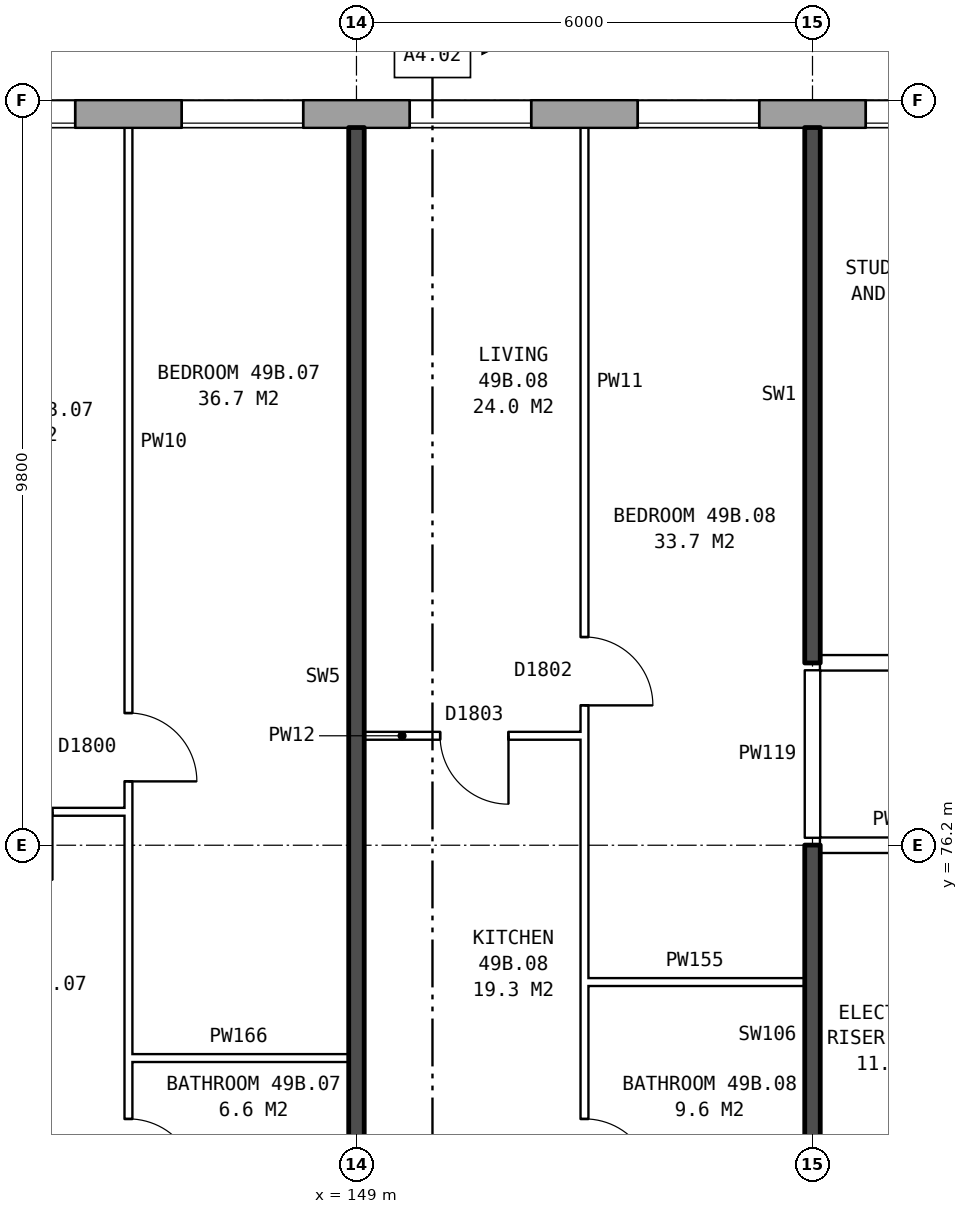
"""IFC4 building model, lengths in metres.
Left out: names, types, materials, properties, quantities, classifications, styles, units other than length and angle.
Written with IfcOpenShell. Run it as: python <this file> out.ifc"""

import sys

from ifc_helpers import new_model, si_unit, direction, frame, frame_2d, origin, place, context, subcontext, project, spatial, rectangle, extrude, element, fill, save


model = new_model("IFC4")
c1 = context("Model", 3, precision=1e-05, world=origin(), true_north=direction((0.0, 1.0)))
c2 = subcontext(c1, "Body", "Model", "MODEL_VIEW")
j1 = project(units=[si_unit("LENGTHUNIT", "METRE"), si_unit("PLANEANGLEUNIT", "RADIAN")], contexts=[c1])
p1 = place(None, origin())
s1 = spatial("IfcSite", under=j1, at=p1, CompositionType="ELEMENT")
p2 = place(p1, origin())
s2 = spatial("IfcBuilding", under=s1, at=p2, CompositionType="ELEMENT")
p3 = place(p2, frame((0.0, 0.0, 175.8)))
s3 = spatial("IfcBuildingStorey", under=s2, at=p3, CompositionType="ELEMENT", Elevation=175.8)
p4 = place(p3, frame((167.175, 85.82, 0.0), z_axis=(0.0, 0.0, 1.0), x_axis=(-1.0, 0.0, 0.0)))
e1 = element("IfcWall", 1, at=p4, inside=s3, PredefinedType="STANDARD", context=c2, shape_type="SweptSolid", body=[
    extrude(rectangle(XDim=33.101, YDim=0.36, at=frame_2d((16.55, 0.0))), origin(), (0.0, 0.0, 1.0), 2.85),
])
p5 = place(p4, frame((0.3, 0.0, 0.8)))
e2 = element("IfcOpeningElement", 2, at=p5, cuts=e1, PredefinedType="OPENING", context=c2, shape_type="SweptSolid", body=[
    extrude(rectangle(XDim=0.6, YDim=1.8, at=frame_2d((0.3, 0.9))), frame((0.0, 0.19, 0.0), z_axis=(0.0, -1.0, 0.0), x_axis=(1.0, 0.0, 0.0)), (0.0, 0.0, 1.0), 0.38),
])
p6 = place(p4, frame((3.875, 0.0, 0.8)))
e3 = element("IfcOpeningElement", 3, at=p6, cuts=e1, PredefinedType="OPENING", context=c2, shape_type="SweptSolid", body=[
    extrude(rectangle(XDim=1.6, YDim=1.8, at=frame_2d((0.8, 0.9))), frame((0.0, 0.19, 0.0), z_axis=(0.0, -1.0, 0.0), x_axis=(1.0, 0.0, 0.0)), (0.0, 0.0, 1.0), 0.38),
])
p7 = place(p4, frame((6.875, 0.0, 0.8)))
e4 = element("IfcOpeningElement", 4, at=p7, cuts=e1, PredefinedType="OPENING", context=c2, shape_type="SweptSolid", body=[
    extrude(rectangle(XDim=1.6, YDim=1.8, at=frame_2d((0.8, 0.9))), frame((0.0, 0.19, 0.0), z_axis=(0.0, -1.0, 0.0), x_axis=(1.0, 0.0, 0.0)), (0.0, 0.0, 1.0), 0.38),
])
p8 = place(p4, frame((9.875, 0.0, 0.8)))
e5 = element("IfcOpeningElement", 5, at=p8, cuts=e1, PredefinedType="OPENING", context=c2, shape_type="SweptSolid", body=[
    extrude(rectangle(XDim=1.6, YDim=1.8, at=frame_2d((0.8, 0.9))), frame((0.0, 0.19, 0.0), z_axis=(0.0, -1.0, 0.0), x_axis=(1.0, 0.0, 0.0)), (0.0, 0.0, 1.0), 0.38),
])
p9 = place(p4, frame((12.875, 0.0, 0.8)))
e6 = element("IfcOpeningElement", 6, at=p9, cuts=e1, PredefinedType="OPENING", context=c2, shape_type="SweptSolid", body=[
    extrude(rectangle(XDim=1.6, YDim=1.8, at=frame_2d((0.8, 0.9))), frame((0.0, 0.19, 0.0), z_axis=(0.0, -1.0, 0.0), x_axis=(1.0, 0.0, 0.0)), (0.0, 0.0, 1.0), 0.38),
])
p10 = place(p4, frame((15.875, 0.0, 0.8)))
e7 = element("IfcOpeningElement", 7, at=p10, cuts=e1, PredefinedType="OPENING", context=c2, shape_type="SweptSolid", body=[
    extrude(rectangle(XDim=1.6, YDim=1.8, at=frame_2d((0.8, 0.9))), frame((0.0, 0.19, 0.0), z_axis=(0.0, -1.0, 0.0), x_axis=(1.0, 0.0, 0.0)), (0.0, 0.0, 1.0), 0.38),
])
p11 = place(p4, frame((18.875, 0.0, 0.8)))
e8 = element("IfcOpeningElement", 8, at=p11, cuts=e1, PredefinedType="OPENING", context=c2, shape_type="SweptSolid", body=[
    extrude(rectangle(XDim=1.6, YDim=1.8, at=frame_2d((0.8, 0.9))), frame((0.0, 0.19, 0.0), z_axis=(0.0, -1.0, 0.0), x_axis=(1.0, 0.0, 0.0)), (0.0, 0.0, 1.0), 0.38),
])
p12 = place(p4, frame((21.875, 0.0, 0.8)))
e9 = element("IfcOpeningElement", 9, at=p12, cuts=e1, PredefinedType="OPENING", context=c2, shape_type="SweptSolid", body=[
    extrude(rectangle(XDim=1.6, YDim=1.8, at=frame_2d((0.8, 0.9))), frame((0.0, 0.19, 0.0), z_axis=(0.0, -1.0, 0.0), x_axis=(1.0, 0.0, 0.0)), (0.0, 0.0, 1.0), 0.38),
])
p13 = place(p4, frame((24.875, 0.0, 0.8)))
e10 = element("IfcOpeningElement", 10, at=p13, cuts=e1, PredefinedType="OPENING", context=c2, shape_type="SweptSolid", body=[
    extrude(rectangle(XDim=1.6, YDim=1.8, at=frame_2d((0.8, 0.9))), frame((0.0, 0.19, 0.0), z_axis=(0.0, -1.0, 0.0), x_axis=(1.0, 0.0, 0.0)), (0.0, 0.0, 1.0), 0.38),
])
p14 = place(p4, frame((27.875, 0.0, 0.8)))
e11 = element("IfcOpeningElement", 11, at=p14, cuts=e1, PredefinedType="OPENING", context=c2, shape_type="SweptSolid", body=[
    extrude(rectangle(XDim=1.6, YDim=1.8, at=frame_2d((0.8, 0.9))), frame((0.0, 0.19, 0.0), z_axis=(0.0, -1.0, 0.0), x_axis=(1.0, 0.0, 0.0)), (0.0, 0.0, 1.0), 0.38),
])
p15 = place(p4, frame((31.575, 0.0, 1.4)))
e12 = element("IfcOpeningElement", 12, at=p15, cuts=e1, PredefinedType="OPENING", context=c2, shape_type="SweptSolid", body=[
    extrude(rectangle(XDim=1.2, YDim=1.2, at=frame_2d((0.6, 0.6))), frame((0.0, 0.19, 0.0), z_axis=(0.0, -1.0, 0.0), x_axis=(1.0, 0.0, 0.0)), (0.0, 0.0, 1.0), 0.38),
])
p16 = place(p4, frame((1.2, 0.0, 1.7)))
e13 = element("IfcOpeningElement", 13, at=p16, cuts=e1, PredefinedType="OPENING", context=c2, shape_type="SweptSolid", body=[
    extrude(rectangle(XDim=0.6, YDim=0.9, at=frame_2d((0.3, 0.45))), frame((0.0, 0.19, 0.0), z_axis=(0.0, -1.0, 0.0), x_axis=(1.0, 0.0, 0.0)), (0.0, 0.0, 1.0), 0.38),
])
p17 = place(p4, frame((2.8, 0.0, 0.8)))
e14 = element("IfcOpeningElement", 14, at=p17, cuts=e1, PredefinedType="OPENING", context=c2, shape_type="SweptSolid", body=[
    extrude(rectangle(XDim=0.6, YDim=0.9, at=frame_2d((0.3, 0.45))), frame((0.0, 0.19, 0.0), z_axis=(0.0, -1.0, 0.0), x_axis=(1.0, 0.0, 0.0)), (0.0, 0.0, 1.0), 0.38),
])
for number, where, z_axis, x_axis in (
    (15, (146.0, 73.4, 0.0), (0.0, 0.0, 1.0), (1.0, 0.0, 0.0)),
    (16, (152.0, 74.4, 0.0), (0.0, 0.0, 1.0), (1.0, 0.0, 0.0)),
):
    element("IfcWall", number, at=place(p3, frame(where, z_axis=z_axis, x_axis=x_axis)), inside=s3, PredefinedType="PARTITIONING", context=c2, shape_type="SweptSolid", body=[
        extrude(rectangle(XDim=2.9, YDim=0.1, at=frame_2d((1.45, 0.0))), origin(), (0.0, 0.0, 1.0), 2.85),
    ])
p18 = place(p3, frame((155.1, 76.2, 0.0), z_axis=(0.0, 0.0, 1.0), x_axis=(1.0, 0.0, 0.0)))
e17 = element("IfcWall", 17, at=p18, inside=s3, PredefinedType="PARTITIONING", context=c2, shape_type="SweptSolid", body=[
    extrude(rectangle(XDim=2.14, YDim=0.2, at=frame_2d((1.07, 0.0))), origin(), (0.0, 0.0, 1.0), 2.85),
])
p19 = place(p3, frame((143.1, 76.64, 0.0), z_axis=(0.0, 0.0, 1.0), x_axis=(1.0, 0.0, 0.0)))
e18 = element("IfcWall", 18, at=p19, inside=s3, PredefinedType="PARTITIONING", context=c2, shape_type="SweptSolid", body=[
    extrude(rectangle(XDim=2.9, YDim=0.1, at=frame_2d((1.45, 0.0))), origin(), (0.0, 0.0, 1.0), 2.85),
])
p20 = place(p19, frame((1.0, 0.0, 0.0)))
e19 = element("IfcOpeningElement", 19, at=p20, cuts=e18, PredefinedType="OPENING", context=c2, shape_type="SweptSolid", body=[
    extrude(rectangle(XDim=0.9, YDim=2.1, at=frame_2d((0.45, 1.05))), frame((0.0, 0.06, 0.0), z_axis=(0.0, -1.0, 0.0), x_axis=(1.0, 0.0, 0.0)), (0.0, 0.0, 1.0), 0.12),
])
p21 = place(p3, frame((149.1, 77.64, 0.0), z_axis=(0.0, 0.0, 1.0), x_axis=(1.0, 0.0, 0.0)))
e20 = element("IfcWall", 20, at=p21, inside=s3, PredefinedType="PARTITIONING", context=c2, shape_type="SweptSolid", body=[
    extrude(rectangle(XDim=2.9, YDim=0.1, at=frame_2d((1.45, 0.0))), origin(), (0.0, 0.0, 1.0), 2.85),
])
p22 = place(p21, frame((1.0, 0.0, 0.0)))
e21 = element("IfcOpeningElement", 21, at=p22, cuts=e20, PredefinedType="OPENING", context=c2, shape_type="SweptSolid", body=[
    extrude(rectangle(XDim=0.9, YDim=2.1, at=frame_2d((0.45, 1.05))), frame((0.0, 0.06, 0.0), z_axis=(0.0, -1.0, 0.0), x_axis=(1.0, 0.0, 0.0)), (0.0, 0.0, 1.0), 0.12),
])
p23 = place(p3, frame((155.1, 78.6, 0.0), z_axis=(0.0, 0.0, 1.0), x_axis=(1.0, 0.0, 0.0)))
e22 = element("IfcWall", 22, at=p23, inside=s3, PredefinedType="PARTITIONING", context=c2, shape_type="SweptSolid", body=[
    extrude(rectangle(XDim=14.79, YDim=0.2, at=frame_2d((7.395, 0.0))), origin(), (0.0, 0.0, 1.0), 2.85),
])
p24 = place(p23, frame((1.45, 0.0, 0.0)))
e23 = element("IfcOpeningElement", 23, at=p24, cuts=e22, PredefinedType="OPENING", context=c2, shape_type="SweptSolid", body=[
    extrude(rectangle(XDim=1.0, YDim=2.1, at=frame_2d((0.5, 1.05))), frame((0.0, 0.11, 0.0), z_axis=(0.0, -1.0, 0.0), x_axis=(1.0, 0.0, 0.0)), (0.0, 0.0, 1.0), 0.22),
])
p25 = place(p23, frame((11.045, 0.0, 0.0)))
e24 = element("IfcOpeningElement", 24, at=p25, cuts=e22, PredefinedType="OPENING", context=c2, shape_type="SweptSolid", body=[
    extrude(rectangle(XDim=1.0, YDim=2.1, at=frame_2d((0.5, 1.05))), frame((0.0, 0.11, 0.0), z_axis=(0.0, -1.0, 0.0), x_axis=(1.0, 0.0, 0.0)), (0.0, 0.0, 1.0), 0.22),
])
p26 = place(p3, frame((146.0, 71.3, 0.0), z_axis=(0.0, 0.0, 1.0), x_axis=(0.0, 1.0, 0.0)))
e25 = element("IfcWall", 25, at=p26, inside=s3, PredefinedType="PARTITIONING", context=c2, shape_type="SweptSolid", body=[
    extrude(rectangle(XDim=14.34, YDim=0.1, at=frame_2d((7.17, 0.0))), origin(), (0.0, 0.0, 1.0), 2.85),
])
p27 = place(p26, frame((5.74, 0.0, 0.0)))
e26 = element("IfcOpeningElement", 26, at=p27, cuts=e25, PredefinedType="OPENING", context=c2, shape_type="SweptSolid", body=[
    extrude(rectangle(XDim=0.9, YDim=2.1, at=frame_2d((0.45, 1.05))), frame((0.0, 0.06, 0.0), z_axis=(0.0, -1.0, 0.0), x_axis=(1.0, 0.0, 0.0)), (0.0, 0.0, 1.0), 0.12),
])
p28 = place(p26, frame((0.4, 0.0, 0.0)))
e27 = element("IfcOpeningElement", 27, at=p28, cuts=e25, PredefinedType="OPENING", context=c2, shape_type="SweptSolid", body=[
    extrude(rectangle(XDim=0.9, YDim=2.1, at=frame_2d((0.45, 1.05))), frame((0.0, 0.06, 0.0), z_axis=(0.0, -1.0, 0.0), x_axis=(1.0, 0.0, 0.0)), (0.0, 0.0, 1.0), 0.12),
])
p29 = place(p3, frame((149.0, 71.2, 0.0), z_axis=(0.0, 0.0, 1.0), x_axis=(0.0, 1.0, 0.0)))
e28 = element("IfcWall", 28, at=p29, inside=s3, PredefinedType="SOLIDWALL", context=c2, shape_type="SweptSolid", body=[
    extrude(rectangle(XDim=14.44, YDim=0.2, at=frame_2d((7.22, 0.0))), origin(), (0.0, 0.0, 1.0), 2.85),
])
p30 = place(p3, frame((152.0, 71.3, 0.0), z_axis=(0.0, 0.0, 1.0), x_axis=(0.0, 1.0, 0.0)))
e29 = element("IfcWall", 29, at=p30, inside=s3, PredefinedType="PARTITIONING", context=c2, shape_type="SweptSolid", body=[
    extrude(rectangle(XDim=14.34, YDim=0.1, at=frame_2d((7.17, 0.0))), origin(), (0.0, 0.0, 1.0), 2.85),
])
p31 = place(p30, frame((6.74, 0.0, 0.0)))
e30 = element("IfcOpeningElement", 30, at=p31, cuts=e29, PredefinedType="OPENING", context=c2, shape_type="SweptSolid", body=[
    extrude(rectangle(XDim=0.9, YDim=2.1, at=frame_2d((0.45, 1.05))), frame((0.0, 0.06, 0.0), z_axis=(0.0, -1.0, 0.0), x_axis=(1.0, 0.0, 0.0)), (0.0, 0.0, 1.0), 0.12),
])
p32 = place(p30, frame((0.4, 0.0, 0.0)))
e31 = element("IfcOpeningElement", 31, at=p32, cuts=e29, PredefinedType="OPENING", context=c2, shape_type="SweptSolid", body=[
    extrude(rectangle(XDim=0.9, YDim=2.1, at=frame_2d((0.45, 1.05))), frame((0.0, 0.06, 0.0), z_axis=(0.0, -1.0, 0.0), x_axis=(1.0, 0.0, 0.0)), (0.0, 0.0, 1.0), 0.12),
])
p33 = place(p3, frame((155.0, 71.2, 0.0), z_axis=(0.0, 0.0, 1.0), x_axis=(0.0, 1.0, 0.0)))
e32 = element("IfcWall", 32, at=p33, inside=s3, PredefinedType="SOLIDWALL", context=c2, shape_type="SweptSolid", body=[
    extrude(rectangle(XDim=5.0, YDim=0.2, at=frame_2d((2.5, 0.0))), origin(), (0.0, 0.0, 1.0), 2.85),
])
p34 = place(p3, frame((155.0, 76.3, 0.0), z_axis=(0.0, 0.0, 1.0), x_axis=(0.0, 1.0, 0.0)))
e33 = element("IfcWall", 33, at=p34, inside=s3, PredefinedType="PARTITIONING", context=c2, shape_type="SweptSolid", body=[
    extrude(rectangle(XDim=2.2, YDim=0.2, at=frame_2d((1.1, 0.0))), origin(), (0.0, 0.0, 1.0), 2.85),
])
p35 = place(p3, frame((155.0, 78.6, 0.0), z_axis=(0.0, 0.0, 1.0), x_axis=(0.0, 1.0, 0.0)))
e34 = element("IfcWall", 34, at=p35, inside=s3, PredefinedType="SOLIDWALL", context=c2, shape_type="SweptSolid", body=[
    extrude(rectangle(XDim=7.04, YDim=0.2, at=frame_2d((3.52, 0.0))), origin(), (0.0, 0.0, 1.0), 2.85),
])
p36 = place(p8, origin())
e35 = element("IfcWindow", 35, at=p36, inside=s3, PartitioningType="SINGLE_PANEL", PredefinedType="WINDOW", context=c2, shape_type="SweptSolid", body=[
    extrude(rectangle(XDim=1.6, YDim=1.8, at=frame_2d((0.8, 0.9))), frame((0.0, 0.15, 0.0), z_axis=(0.0, -1.0, 0.0), x_axis=(1.0, 0.0, 0.0)), (0.0, 0.0, 1.0), 0.06),
])
fill(e5, e35)
p37 = place(p9, origin())
e36 = element("IfcWindow", 36, at=p37, inside=s3, PartitioningType="SINGLE_PANEL", PredefinedType="WINDOW", context=c2, shape_type="SweptSolid", body=[
    extrude(rectangle(XDim=1.6, YDim=1.8, at=frame_2d((0.8, 0.9))), frame((0.0, 0.15, 0.0), z_axis=(0.0, -1.0, 0.0), x_axis=(1.0, 0.0, 0.0)), (0.0, 0.0, 1.0), 0.06),
])
fill(e6, e36)
p38 = place(p10, origin())
e37 = element("IfcWindow", 37, at=p38, inside=s3, PartitioningType="SINGLE_PANEL", PredefinedType="WINDOW", context=c2, shape_type="SweptSolid", body=[
    extrude(rectangle(XDim=1.6, YDim=1.8, at=frame_2d((0.8, 0.9))), frame((0.0, 0.15, 0.0), z_axis=(0.0, -1.0, 0.0), x_axis=(1.0, 0.0, 0.0)), (0.0, 0.0, 1.0), 0.06),
])
fill(e7, e37)
p39 = place(p11, origin())
e38 = element("IfcWindow", 38, at=p39, inside=s3, PartitioningType="SINGLE_PANEL", PredefinedType="WINDOW", context=c2, shape_type="SweptSolid", body=[
    extrude(rectangle(XDim=1.6, YDim=1.8, at=frame_2d((0.8, 0.9))), frame((0.0, 0.15, 0.0), z_axis=(0.0, -1.0, 0.0), x_axis=(1.0, 0.0, 0.0)), (0.0, 0.0, 1.0), 0.06),
])
fill(e8, e38)
p40 = place(p12, origin())
e39 = element("IfcWindow", 39, at=p40, inside=s3, PartitioningType="SINGLE_PANEL", PredefinedType="WINDOW", context=c2, shape_type="SweptSolid", body=[
    extrude(rectangle(XDim=1.6, YDim=1.8, at=frame_2d((0.8, 0.9))), frame((0.0, 0.15, 0.0), z_axis=(0.0, -1.0, 0.0), x_axis=(1.0, 0.0, 0.0)), (0.0, 0.0, 1.0), 0.06),
])
fill(e9, e39)
p41 = place(p27, frame((0.9, 0.0, 0.0), z_axis=(0.0, 0.0, 1.0), x_axis=(-1.0, 0.0, 0.0)))
e40 = element("IfcDoor", 40, at=p41, inside=s3, OperationType="SINGLE_SWING_RIGHT", PredefinedType="DOOR", context=c2, shape_type="SweptSolid", body=[
    extrude(rectangle(XDim=0.9, YDim=2.1, at=frame_2d((0.45, 1.05))), frame((0.0, 0.025, 0.0), z_axis=(0.0, -1.0, 0.0), x_axis=(1.0, 0.0, 0.0)), (0.0, 0.0, 1.0), 0.05),
])
fill(e26, e40)
p42 = place(p28, frame((0.9, 0.0, 0.0), z_axis=(0.0, 0.0, 1.0), x_axis=(-1.0, 0.0, 0.0)))
e41 = element("IfcDoor", 41, at=p42, inside=s3, OperationType="SINGLE_SWING_RIGHT", PredefinedType="DOOR", context=c2, shape_type="SweptSolid", body=[
    extrude(rectangle(XDim=0.9, YDim=2.1, at=frame_2d((0.45, 1.05))), frame((0.0, 0.025, 0.0), z_axis=(0.0, -1.0, 0.0), x_axis=(1.0, 0.0, 0.0)), (0.0, 0.0, 1.0), 0.05),
])
fill(e27, e41)
p43 = place(p31, frame((0.9, 0.0, 0.0), z_axis=(0.0, 0.0, 1.0), x_axis=(-1.0, 0.0, 0.0)))
e42 = element("IfcDoor", 42, at=p43, inside=s3, OperationType="SINGLE_SWING_RIGHT", PredefinedType="DOOR", context=c2, shape_type="SweptSolid", body=[
    extrude(rectangle(XDim=0.9, YDim=2.1, at=frame_2d((0.45, 1.05))), frame((0.0, 0.025, 0.0), z_axis=(0.0, -1.0, 0.0), x_axis=(1.0, 0.0, 0.0)), (0.0, 0.0, 1.0), 0.05),
])
fill(e30, e42)
p44 = place(p22, frame((0.9, 0.0, 0.0), z_axis=(0.0, 0.0, 1.0), x_axis=(-1.0, 0.0, 0.0)))
e43 = element("IfcDoor", 43, at=p44, inside=s3, OperationType="SINGLE_SWING_LEFT", PredefinedType="DOOR", context=c2, shape_type="SweptSolid", body=[
    extrude(rectangle(XDim=0.9, YDim=2.1, at=frame_2d((0.45, 1.05))), frame((0.0, 0.025, 0.0), z_axis=(0.0, -1.0, 0.0), x_axis=(1.0, 0.0, 0.0)), (0.0, 0.0, 1.0), 0.05),
])
fill(e21, e43)
p45 = place(p32, frame((0.9, 0.0, 0.0), z_axis=(0.0, 0.0, 1.0), x_axis=(-1.0, 0.0, 0.0)))
e44 = element("IfcDoor", 44, at=p45, inside=s3, OperationType="SINGLE_SWING_RIGHT", PredefinedType="DOOR", context=c2, shape_type="SweptSolid", body=[
    extrude(rectangle(XDim=0.9, YDim=2.1, at=frame_2d((0.45, 1.05))), frame((0.0, 0.025, 0.0), z_axis=(0.0, -1.0, 0.0), x_axis=(1.0, 0.0, 0.0)), (0.0, 0.0, 1.0), 0.05),
])
fill(e31, e44)
save(model, sys.argv[1])
